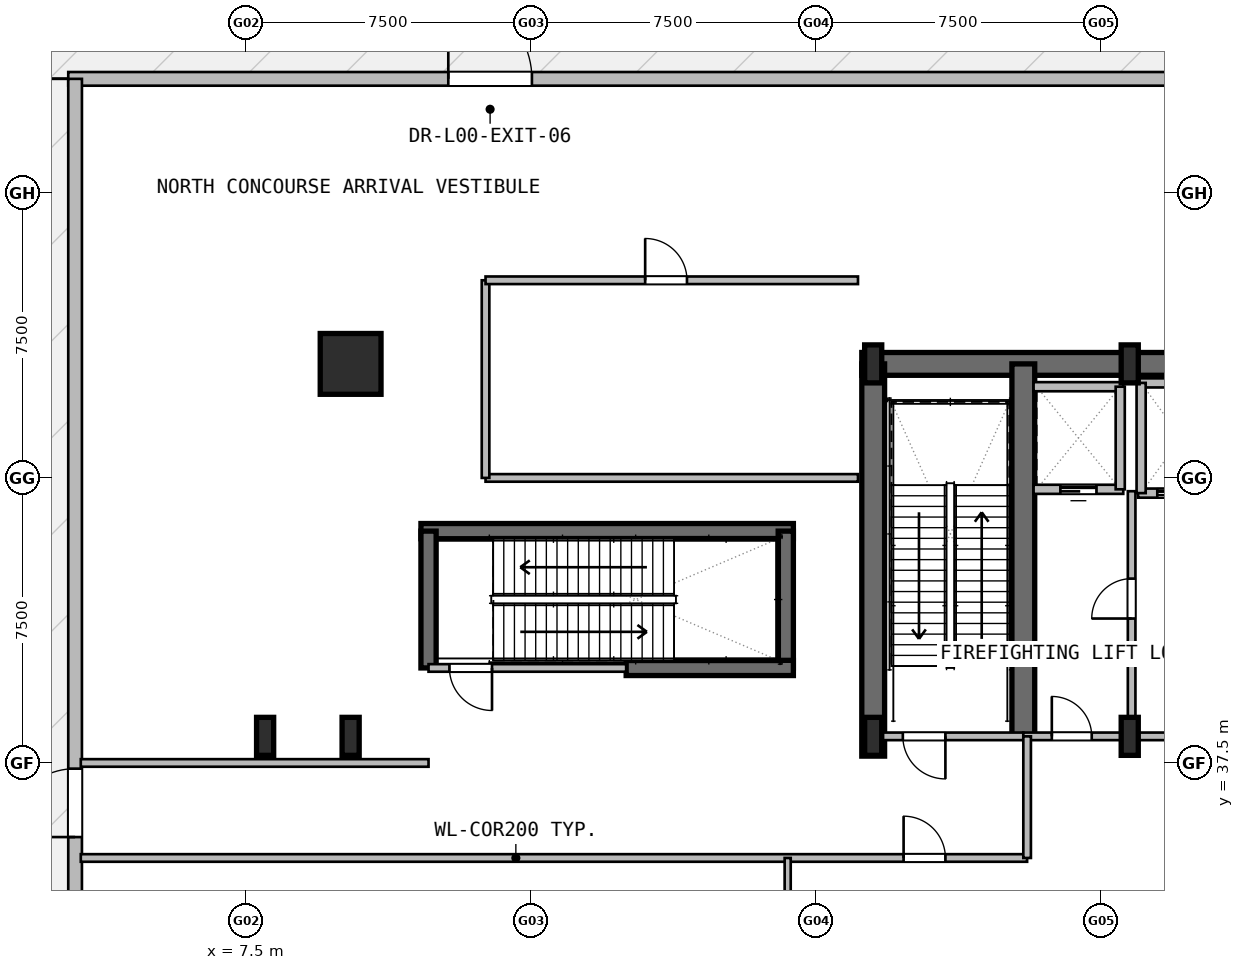
"""IFC4 building model, lengths in metres.
Left out: names, types, materials, properties, quantities, classifications, styles, units other than length and angle.
Written with IfcOpenShell. Run it as: python <this file> out.ifc"""

import sys

from ifc_helpers import new_model, si_unit, direction, frame, frame_2d, origin, origin_2d, place, context, subcontext, project, spatial, rectangle, hollow_rectangle, i_section, extrude, element, fill, save


model = new_model("IFC4")
c1 = context("Model", 3, precision=1e-05, world=origin(), true_north=direction((0.0, 1.0)))
c2 = subcontext(c1, "Body", "Model", "MODEL_VIEW")
j1 = project(units=[si_unit("LENGTHUNIT", "METRE"), si_unit("PLANEANGLEUNIT", "RADIAN")], contexts=[c1])
p1 = place(None, origin())
s1 = spatial("IfcSite", under=j1, at=p1, CompositionType="ELEMENT")
p2 = place(p1, origin())
s2 = spatial("IfcBuilding", under=s1, at=p2, CompositionType="ELEMENT")
p3 = place(p2, origin())
s3 = spatial("IfcBuildingStorey", under=s2, at=p3, CompositionType="ELEMENT", Elevation=0.0)
p4 = place(p3, frame((23.7, 48.0, 0.0), z_axis=(0.0, 0.0, 1.0), x_axis=(1.0, 0.0, 0.0)))
e1 = element("IfcWall", 1, at=p4, inside=s3, PredefinedType="SHEAR", context=c2, shape_type="SweptSolid", body=[
    extrude(rectangle(XDim=27.6, YDim=0.6, at=frame_2d((13.8, 0.0))), origin(), (0.0, 0.0, 1.0), 6.0),
])
p5 = place(p3, frame((24.0, 37.68, 0.0), z_axis=(0.0, 0.0, 1.0), x_axis=(0.0, 1.0, 0.0)))
e2 = element("IfcWall", 2, at=p5, inside=s3, PredefinedType="SHEAR", context=c2, shape_type="SweptSolid", body=[
    extrude(rectangle(XDim=10.32, YDim=0.6, at=frame_2d((5.16, 0.0))), origin(), (0.0, 0.0, 1.0), 6.0),
])
p6 = place(p3, frame((27.95, 38.2, 0.0), z_axis=(0.0, 0.0, 1.0), x_axis=(0.0, 1.0, 0.0)))
e3 = element("IfcWall", 3, at=p6, inside=s3, PredefinedType="SHEAR", context=c2, shape_type="SweptSolid", body=[
    extrude(rectangle(XDim=9.8, YDim=0.6, at=frame_2d((4.9, 0.0))), origin(), (0.0, 0.0, 1.0), 6.0),
])
p7 = place(p3, frame((10.25, 38.2, 0.0), z_axis=(0.0, 0.0, 1.0), x_axis=(1.0, 0.0, 0.0)))
e4 = element("IfcColumn", 4, at=p7, inside=s3, PredefinedType="COLUMN", context=c2, shape_type="SweptSolid", body=[
    extrude(i_section(OverallWidth=0.45, OverallDepth=1.0, WebThickness=0.022, FlangeThickness=0.04, at=origin_2d()), origin(), (0.0, 0.0, 1.0), 6.0),
])
p8 = place(p3, frame((10.25, 48.0, 0.0), z_axis=(0.0, 0.0, 1.0), x_axis=(1.0, 0.0, 0.0)))
e5 = element("IfcColumn", 5, at=p8, inside=s3, PredefinedType="COLUMN", context=c2, shape_type="SweptSolid", body=[
    extrude(hollow_rectangle(XDim=1.6, YDim=1.6, WallThickness=0.04, at=origin_2d()), origin(), (0.0, 0.0, 1.0), 6.0),
])
for number, where, z_axis, x_axis in (
    (6, (24.0, 38.2, 0.0), (0.0, 0.0, 1.0), (1.0, 0.0, 0.0)),
    (7, (24.0, 48.0, 0.0), (0.0, 0.0, 1.0), (1.0, 0.0, 0.0)),
    (8, (30.75, 38.2, 0.0), (0.0, 0.0, 1.0), (1.0, 0.0, 0.0)),
    (9, (30.75, 48.0, 0.0), (0.0, 0.0, 1.0), (1.0, 0.0, 0.0)),
    (10, (8.0, 38.2, 0.0), (0.0, 0.0, 1.0), (1.0, 0.0, 0.0)),
):
    element("IfcColumn", number, at=place(p3, frame(where, z_axis=z_axis, x_axis=x_axis)), inside=s3, PredefinedType="COLUMN", context=c2, shape_type="SweptSolid", body=[
        extrude(i_section(OverallWidth=0.45, OverallDepth=1.0, WebThickness=0.022, FlangeThickness=0.04, at=origin_2d()), origin(), (0.0, 0.0, 1.0), 6.0),
    ])
p9 = place(p3, frame((12.1, 43.6, 0.0), z_axis=(0.0, 0.0, 1.0), x_axis=(1.0, 0.0, 0.0)))
e11 = element("IfcWall", 11, at=p9, inside=s3, PredefinedType="SHEAR", context=c2, shape_type="SweptSolid", body=[
    extrude(rectangle(XDim=9.8, YDim=0.4, at=frame_2d((4.9, 0.0))), origin(), (0.0, 0.0, 1.0), 6.0),
])
for number, where, z_axis, x_axis in (
    (12, (12.3, 40.0, 0.0), (0.0, 0.0, 1.0), (0.0, 1.0, 0.0)),
    (13, (21.7, 40.0, 0.0), (0.0, 0.0, 1.0), (0.0, 1.0, 0.0)),
):
    element("IfcWall", number, at=place(p3, frame(where, z_axis=z_axis, x_axis=x_axis)), inside=s3, PredefinedType="SHEAR", context=c2, shape_type="SweptSolid", body=[
        extrude(rectangle(XDim=3.6, YDim=0.4, at=frame_2d((1.8, 0.0))), origin(), (0.0, 0.0, 1.0), 6.0),
    ])
p10 = place(p3, frame((17.5, 40.0, 0.0), z_axis=(0.0, 0.0, 1.0), x_axis=(1.0, 0.0, 0.0)))
e14 = element("IfcWall", 14, at=p10, inside=s3, PredefinedType="SHEAR", context=c2, shape_type="SweptSolid", body=[
    extrude(rectangle(XDim=4.4, YDim=0.4, at=frame_2d((2.2, 0.0))), origin(), (0.0, 0.0, 1.0), 6.0),
])
p11 = place(p3, frame((2.82, 55.5, 0.0), z_axis=(0.0, 0.0, 1.0), x_axis=(1.0, 0.0, 0.0)))
e15 = element("IfcWall", 15, at=p11, inside=s3, PredefinedType="SOLIDWALL", context=c2, shape_type="SweptSolid", body=[
    extrude(rectangle(XDim=51.18, YDim=0.36, at=frame_2d((25.59, 0.0))), origin(), (0.0, 0.0, 1.0), 5.68),
])
p12 = place(p11, frame((10.0, 0.0, 0.0)))
e16 = element("IfcOpeningElement", 16, at=p12, cuts=e15, PredefinedType="OPENING", context=c2, shape_type="SweptSolid", body=[
    extrude(rectangle(XDim=2.2, YDim=2.4, at=frame_2d((1.1, 1.2))), frame((0.0, 0.19, 0.0), z_axis=(0.0, -1.0, 0.0), x_axis=(1.0, 0.0, 0.0)), (0.0, 0.0, 1.0), 0.38),
])
p13 = place(p3, frame((3.0, 4.5, 0.0), z_axis=(0.0, 0.0, 1.0), x_axis=(0.0, 1.0, 0.0)))
e17 = element("IfcWall", 17, at=p13, inside=s3, PredefinedType="SOLIDWALL", context=c2, shape_type="SweptSolid", body=[
    extrude(rectangle(XDim=51.0, YDim=0.36, at=frame_2d((25.5, 0.0))), origin(), (0.0, 0.0, 1.0), 5.68),
])
p14 = place(p13, frame((31.05, 0.0, 0.0)))
e18 = element("IfcOpeningElement", 18, at=p14, cuts=e17, PredefinedType="OPENING", context=c2, shape_type="SweptSolid", body=[
    extrude(rectangle(XDim=1.8, YDim=2.3, at=frame_2d((0.9, 1.15))), frame((0.0, 0.19, 0.0), z_axis=(0.0, -1.0, 0.0), x_axis=(1.0, 0.0, 0.0)), (0.0, 0.0, 1.0), 0.38),
])
p15 = place(p13, frame((16.0, 0.0, 0.0)))
e19 = element("IfcOpeningElement", 19, at=p15, cuts=e17, PredefinedType="OPENING", context=c2, shape_type="SweptSolid", body=[
    extrude(rectangle(XDim=1.8, YDim=2.3, at=frame_2d((0.9, 1.15))), frame((0.0, 0.19, 0.0), z_axis=(0.0, -1.0, 0.0), x_axis=(1.0, 0.0, 0.0)), (0.0, 0.0, 1.0), 0.38),
])
p16 = place(p3, frame((27.95, 38.2, 0.0), z_axis=(0.0, 0.0, 1.0), x_axis=(-1.0, 0.0, 0.0)))
e20 = element("IfcWall", 20, at=p16, inside=s3, PredefinedType="PARTITIONING", context=c2, shape_type="SweptSolid", body=[
    extrude(rectangle(XDim=3.95, YDim=0.2, at=frame_2d((1.975, 0.0))), origin(), (0.0, 0.0, 1.0), 4.88),
])
p17 = place(p16, frame((2.05, 0.0, 0.0)))
e21 = element("IfcOpeningElement", 21, at=p17, cuts=e20, PredefinedType="OPENING", context=c2, shape_type="SweptSolid", body=[
    extrude(rectangle(XDim=1.12, YDim=2.1, at=frame_2d((0.56, 1.05))), frame((0.0, 0.11, 0.0), z_axis=(0.0, -1.0, 0.0), x_axis=(1.0, 0.0, 0.0)), (0.0, 0.0, 1.0), 0.22),
])
p18 = place(p3, frame((30.8, 38.2, 0.0), z_axis=(0.0, 0.0, 1.0), x_axis=(0.0, 1.0, 0.0)))
e22 = element("IfcWall", 22, at=p18, inside=s3, PredefinedType="PARTITIONING", context=c2, shape_type="SweptSolid", body=[
    extrude(rectangle(XDim=6.45, YDim=0.2, at=frame_2d((3.225, 0.0))), origin(), (0.0, 0.0, 1.0), 4.88),
])
p19 = place(p18, frame((3.1, 0.0, 0.0)))
e23 = element("IfcOpeningElement", 23, at=p19, cuts=e22, PredefinedType="OPENING", context=c2, shape_type="SweptSolid", body=[
    extrude(rectangle(XDim=1.05, YDim=2.1, at=frame_2d((0.525, 1.05))), frame((0.0, 0.11, 0.0), z_axis=(0.0, -1.0, 0.0), x_axis=(1.0, 0.0, 0.0)), (0.0, 0.0, 1.0), 0.22),
])
p20 = place(p3, frame((27.95, 38.2, 0.0), z_axis=(0.0, 0.0, 1.0), x_axis=(1.0, 0.0, 0.0)))
e24 = element("IfcWall", 24, at=p20, inside=s3, PredefinedType="PARTITIONING", context=c2, shape_type="SweptSolid", body=[
    extrude(rectangle(XDim=2.85, YDim=0.2, at=frame_2d((1.425, 0.0))), origin(), (0.0, 0.0, 1.0), 4.88),
])
p21 = place(p20, frame((0.75, 0.0, 0.0)))
e25 = element("IfcOpeningElement", 25, at=p21, cuts=e24, PredefinedType="OPENING", context=c2, shape_type="SweptSolid", body=[
    extrude(rectangle(XDim=1.05, YDim=2.1, at=frame_2d((0.525, 1.05))), frame((0.0, 0.11, 0.0), z_axis=(0.0, -1.0, 0.0), x_axis=(1.0, 0.0, 0.0)), (0.0, 0.0, 1.0), 0.22),
])
p22 = place(p3, frame((30.8, 38.2, 0.0), z_axis=(0.0, 0.0, 1.0), x_axis=(1.0, 0.0, 0.0)))
e26 = element("IfcWall", 26, at=p22, inside=s3, PredefinedType="PARTITIONING", context=c2, shape_type="SweptSolid", body=[
    extrude(rectangle(XDim=16.35, YDim=0.2, at=frame_2d((8.175, 0.0))), origin(), (0.0, 0.0, 1.0), 4.88),
])
p23 = place(p22, frame((2.95, 0.0, 0.0)))
e27 = element("IfcOpeningElement", 27, at=p23, cuts=e26, PredefinedType="OPENING", context=c2, shape_type="SweptSolid", body=[
    extrude(rectangle(XDim=1.12, YDim=2.1, at=frame_2d((0.56, 1.05))), frame((0.0, 0.11, 0.0), z_axis=(0.0, -1.0, 0.0), x_axis=(1.0, 0.0, 0.0)), (0.0, 0.0, 1.0), 0.22),
])
p24 = place(p3, frame((28.22, 44.7, 0.0), z_axis=(0.0, 0.0, 1.0), x_axis=(1.0, 0.0, 0.0)))
e28 = element("IfcWall", 28, at=p24, inside=s3, PredefinedType="PARTITIONING", context=c2, shape_type="SweptSolid", body=[
    extrude(rectangle(XDim=2.36, YDim=0.24, at=frame_2d((1.18, 0.0))), origin(), (0.0, 0.0, 1.0), 5.68),
])
p25 = place(p24, frame((0.705, 0.0, 0.0)))
e29 = element("IfcOpeningElement", 29, at=p25, cuts=e28, PredefinedType="OPENING", context=c2, shape_type="SweptSolid", body=[
    extrude(rectangle(XDim=0.95, YDim=2.15, at=frame_2d((0.475, 1.075))), frame((0.0, 0.13, 0.0), z_axis=(0.0, -1.0, 0.0), x_axis=(1.0, 0.0, 0.0)), (0.0, 0.0, 1.0), 0.26),
])
p26 = place(p3, frame((28.22, 47.4, 0.0), z_axis=(0.0, 0.0, 1.0), x_axis=(1.0, 0.0, 0.0)))
e30 = element("IfcWall", 30, at=p26, inside=s3, PredefinedType="PARTITIONING", context=c2, shape_type="SweptSolid", body=[
    extrude(rectangle(XDim=2.36, YDim=0.24, at=frame_2d((1.18, 0.0))), origin(), (0.0, 0.0, 1.0), 5.68),
])
p27 = place(p3, frame((30.5, 44.7, 0.0), z_axis=(0.0, 0.0, 1.0), x_axis=(0.0, 1.0, 0.0)))
e31 = element("IfcWall", 31, at=p27, inside=s3, PredefinedType="PARTITIONING", context=c2, shape_type="SweptSolid", body=[
    extrude(rectangle(XDim=2.7, YDim=0.24, at=frame_2d((1.35, 0.0))), origin(), (0.0, 0.0, 1.0), 4.88),
])
p28 = place(p3, frame((30.97, 44.6, 0.0), z_axis=(0.0, 0.0, 1.0), x_axis=(1.0, 0.0, 0.0)))
e32 = element("IfcWall", 32, at=p28, inside=s3, PredefinedType="PARTITIONING", context=c2, shape_type="SweptSolid", body=[
    extrude(rectangle(XDim=2.26, YDim=0.24, at=frame_2d((1.13, 0.0))), origin(), (0.0, 0.0, 1.0), 5.68),
])
p29 = place(p28, frame((0.505, 0.0, 0.0)))
e33 = element("IfcOpeningElement", 33, at=p29, cuts=e32, PredefinedType="OPENING", context=c2, shape_type="SweptSolid", body=[
    extrude(rectangle(XDim=1.25, YDim=2.2, at=frame_2d((0.625, 1.1))), frame((0.0, 0.13, 0.0), z_axis=(0.0, -1.0, 0.0), x_axis=(1.0, 0.0, 0.0)), (0.0, 0.0, 1.0), 0.26),
])
p30 = place(p3, frame((30.97, 47.5, 0.0), z_axis=(0.0, 0.0, 1.0), x_axis=(1.0, 0.0, 0.0)))
e34 = element("IfcWall", 34, at=p30, inside=s3, PredefinedType="PARTITIONING", context=c2, shape_type="SweptSolid", body=[
    extrude(rectangle(XDim=2.26, YDim=0.24, at=frame_2d((1.13, 0.0))), origin(), (0.0, 0.0, 1.0), 5.68),
])
p31 = place(p3, frame((31.05, 44.6, 0.0), z_axis=(0.0, 0.0, 1.0), x_axis=(0.0, 1.0, 0.0)))
e35 = element("IfcWall", 35, at=p31, inside=s3, PredefinedType="PARTITIONING", context=c2, shape_type="SweptSolid", body=[
    extrude(rectangle(XDim=2.9, YDim=0.24, at=frame_2d((1.45, 0.0))), origin(), (0.0, 0.0, 1.0), 4.88),
])
p32 = place(p3, frame((17.5, 40.0, 0.0), z_axis=(0.0, 0.0, 1.0), x_axis=(-1.0, 0.0, 0.0)))
e36 = element("IfcWall", 36, at=p32, inside=s3, PredefinedType="PARTITIONING", context=c2, shape_type="SweptSolid", body=[
    extrude(rectangle(XDim=5.2, YDim=0.2, at=frame_2d((2.6, 0.0))), origin(), (0.0, 0.0, 1.0), 5.68),
])
p33 = place(p32, frame((3.53, 0.0, 0.0)))
e37 = element("IfcOpeningElement", 37, at=p33, cuts=e36, PredefinedType="OPENING", context=c2, shape_type="SweptSolid", body=[
    extrude(rectangle(XDim=1.12, YDim=2.1, at=frame_2d((0.56, 1.05))), frame((0.0, 0.11, 0.0), z_axis=(0.0, -1.0, 0.0), x_axis=(1.0, 0.0, 0.0)), (0.0, 0.0, 1.0), 0.22),
])
p34 = place(p3, frame((3.15, 35.0, 0.0), z_axis=(0.0, 0.0, 1.0), x_axis=(1.0, 0.0, 0.0)))
e38 = element("IfcWall", 38, at=p34, inside=s3, PredefinedType="PARTITIONING", context=c2, shape_type="SweptSolid", body=[
    extrude(rectangle(XDim=24.9, YDim=0.2, at=frame_2d((12.45, 0.0))), origin(), (0.0, 0.0, 1.0), 5.68),
])
p35 = place(p34, frame((21.65, 0.0, 0.0)))
e39 = element("IfcOpeningElement", 39, at=p35, cuts=e38, PredefinedType="OPENING", context=c2, shape_type="SweptSolid", body=[
    extrude(rectangle(XDim=1.1, YDim=2.15, at=frame_2d((0.55, 1.075))), frame((0.0, 0.11, 0.0), z_axis=(0.0, -1.0, 0.0), x_axis=(1.0, 0.0, 0.0)), (0.0, 0.0, 1.0), 0.22),
])
p36 = place(p3, frame((28.05, 35.0, 0.0), z_axis=(0.0, 0.0, 1.0), x_axis=(0.0, 1.0, 0.0)))
e40 = element("IfcWall", 40, at=p36, inside=s3, PredefinedType="PARTITIONING", context=c2, shape_type="SweptSolid", body=[
    extrude(rectangle(XDim=3.2, YDim=0.2, at=frame_2d((1.6, 0.0))), origin(), (0.0, 0.0, 1.0), 5.68),
])
p37 = place(p3, frame((3.15, 37.5, 0.0), z_axis=(0.0, 0.0, 1.0), x_axis=(1.0, 0.0, 0.0)))
e41 = element("IfcWall", 41, at=p37, inside=s3, PredefinedType="PARTITIONING", context=c2, shape_type="SweptSolid", body=[
    extrude(rectangle(XDim=9.15, YDim=0.2, at=frame_2d((4.575, 0.0))), origin(), (0.0, 0.0, 1.0), 5.68),
])
p38 = place(p3, frame((13.8, 45.0, 0.0), z_axis=(0.0, 0.0, 1.0), x_axis=(1.0, 0.0, 0.0)))
e42 = element("IfcWall", 42, at=p38, inside=s3, PredefinedType="PARTITIONING", context=c2, shape_type="SweptSolid", body=[
    extrude(rectangle(XDim=9.8, YDim=0.2, at=frame_2d((4.9, 0.0))), origin(), (0.0, 0.0, 1.0), 5.68),
])
p39 = place(p3, frame((13.8, 45.0, 0.0), z_axis=(0.0, 0.0, 1.0), x_axis=(0.0, 1.0, 0.0)))
e43 = element("IfcWall", 43, at=p39, inside=s3, PredefinedType="PARTITIONING", context=c2, shape_type="SweptSolid", body=[
    extrude(rectangle(XDim=5.2, YDim=0.2, at=frame_2d((2.6, 0.0))), origin(), (0.0, 0.0, 1.0), 5.68),
])
p40 = place(p3, frame((13.8, 50.2, 0.0), z_axis=(0.0, 0.0, 1.0), x_axis=(1.0, 0.0, 0.0)))
e44 = element("IfcWall", 44, at=p40, inside=s3, PredefinedType="PARTITIONING", context=c2, shape_type="SweptSolid", body=[
    extrude(rectangle(XDim=9.8, YDim=0.2, at=frame_2d((4.9, 0.0))), origin(), (0.0, 0.0, 1.0), 5.68),
])
p41 = place(p40, frame((4.2, 0.0, 0.0)))
e45 = element("IfcOpeningElement", 45, at=p41, cuts=e44, PredefinedType="OPENING", context=c2, shape_type="SweptSolid", body=[
    extrude(rectangle(XDim=1.1, YDim=2.15, at=frame_2d((0.55, 1.075))), frame((0.0, 0.11, 0.0), z_axis=(0.0, -1.0, 0.0), x_axis=(1.0, 0.0, 0.0)), (0.0, 0.0, 1.0), 0.22),
])
p42 = place(p3, frame((21.75, 12.2, 0.0), z_axis=(0.0, 0.0, 1.0), x_axis=(0.0, 1.0, 0.0)))
e46 = element("IfcWall", 46, at=p42, inside=s3, PredefinedType="PARTITIONING", context=c2, shape_type="SweptSolid", body=[
    extrude(rectangle(XDim=22.8, YDim=0.16, at=frame_2d((11.4, 0.0))), origin(), (0.0, 0.0, 1.0), 5.68),
])
p43 = place(p42, frame((11.0, 0.0, 0.0)))
e47 = element("IfcOpeningElement", 47, at=p43, cuts=e46, PredefinedType="OPENING", context=c2, shape_type="SweptSolid", body=[
    extrude(rectangle(XDim=1.6, YDim=2.2, at=frame_2d((0.8, 1.1))), frame((0.0, 0.09, 0.0), z_axis=(0.0, -1.0, 0.0), x_axis=(1.0, 0.0, 0.0)), (0.0, 0.0, 1.0), 0.18),
])
p44 = place(p12, origin())
e48 = element("IfcDoor", 48, at=p44, inside=s3, OperationType="DOUBLE_DOOR_SINGLE_SWING", PredefinedType="DOOR", context=c2, shape_type="SweptSolid", body=[
    extrude(rectangle(XDim=2.2, YDim=2.4, at=frame_2d((1.1, 1.2))), frame((0.0, 0.025, 0.0), z_axis=(0.0, -1.0, 0.0), x_axis=(1.0, 0.0, 0.0)), (0.0, 0.0, 1.0), 0.05),
])
fill(e16, e48)
p45 = place(p14, origin())
e49 = element("IfcDoor", 49, at=p45, inside=s3, OperationType="DOUBLE_DOOR_SINGLE_SWING", PredefinedType="DOOR", context=c2, shape_type="SweptSolid", body=[
    extrude(rectangle(XDim=1.8, YDim=2.3, at=frame_2d((0.9, 1.15))), frame((0.0, 0.025, 0.0), z_axis=(0.0, -1.0, 0.0), x_axis=(1.0, 0.0, 0.0)), (0.0, 0.0, 1.0), 0.05),
])
fill(e18, e49)
p46 = place(p17, origin())
e50 = element("IfcDoor", 50, at=p46, inside=s3, OperationType="SINGLE_SWING_LEFT", PredefinedType="DOOR", context=c2, shape_type="SweptSolid", body=[
    extrude(rectangle(XDim=1.12, YDim=2.1, at=frame_2d((0.56, 1.05))), frame((0.0, 0.025, 0.0), z_axis=(0.0, -1.0, 0.0), x_axis=(1.0, 0.0, 0.0)), (0.0, 0.0, 1.0), 0.05),
])
fill(e21, e50)
p47 = place(p19, origin())
e51 = element("IfcDoor", 51, at=p47, inside=s3, OperationType="SINGLE_SWING_LEFT", PredefinedType="DOOR", context=c2, shape_type="SweptSolid", body=[
    extrude(rectangle(XDim=1.05, YDim=2.1, at=frame_2d((0.525, 1.05))), frame((0.0, 0.025, 0.0), z_axis=(0.0, -1.0, 0.0), x_axis=(1.0, 0.0, 0.0)), (0.0, 0.0, 1.0), 0.05),
])
fill(e23, e51)
p48 = place(p21, origin())
e52 = element("IfcDoor", 52, at=p48, inside=s3, OperationType="SINGLE_SWING_RIGHT", PredefinedType="DOOR", context=c2, shape_type="SweptSolid", body=[
    extrude(rectangle(XDim=1.05, YDim=2.1, at=frame_2d((0.525, 1.05))), frame((0.0, 0.025, 0.0), z_axis=(0.0, -1.0, 0.0), x_axis=(1.0, 0.0, 0.0)), (0.0, 0.0, 1.0), 0.05),
])
fill(e25, e52)
p49 = place(p25, origin())
e53 = element("IfcDoor", 53, at=p49, inside=s3, OperationType="SLIDING_TO_LEFT", PredefinedType="DOOR", context=c2, shape_type="SweptSolid", body=[
    extrude(rectangle(XDim=0.95, YDim=2.15, at=frame_2d((0.475, 1.075))), frame((0.0, 0.025, 0.0), z_axis=(0.0, -1.0, 0.0), x_axis=(1.0, 0.0, 0.0)), (0.0, 0.0, 1.0), 0.05),
])
fill(e29, e53)
p50 = place(p29, origin())
e54 = element("IfcDoor", 54, at=p50, inside=s3, OperationType="SLIDING_TO_LEFT", PredefinedType="DOOR", context=c2, shape_type="SweptSolid", body=[
    extrude(rectangle(XDim=1.25, YDim=2.2, at=frame_2d((0.625, 1.1))), frame((0.0, 0.025, 0.0), z_axis=(0.0, -1.0, 0.0), x_axis=(1.0, 0.0, 0.0)), (0.0, 0.0, 1.0), 0.05),
])
fill(e33, e54)
p51 = place(p33, origin())
e55 = element("IfcDoor", 55, at=p51, inside=s3, OperationType="SINGLE_SWING_LEFT", PredefinedType="DOOR", context=c2, shape_type="SweptSolid", body=[
    extrude(rectangle(XDim=1.12, YDim=2.1, at=frame_2d((0.56, 1.05))), frame((0.0, 0.025, 0.0), z_axis=(0.0, -1.0, 0.0), x_axis=(1.0, 0.0, 0.0)), (0.0, 0.0, 1.0), 0.05),
])
fill(e37, e55)
p52 = place(p35, origin())
e56 = element("IfcDoor", 56, at=p52, inside=s3, OperationType="SINGLE_SWING_RIGHT", PredefinedType="DOOR", context=c2, shape_type="SweptSolid", body=[
    extrude(rectangle(XDim=1.1, YDim=2.15, at=frame_2d((0.55, 1.075))), frame((0.0, 0.025, 0.0), z_axis=(0.0, -1.0, 0.0), x_axis=(1.0, 0.0, 0.0)), (0.0, 0.0, 1.0), 0.05),
])
fill(e39, e56)
p53 = place(p41, origin())
e57 = element("IfcDoor", 57, at=p53, inside=s3, OperationType="SINGLE_SWING_LEFT", PredefinedType="DOOR", context=c2, shape_type="SweptSolid", body=[
    extrude(rectangle(XDim=1.1, YDim=2.15, at=frame_2d((0.55, 1.075))), frame((0.0, 0.025, 0.0), z_axis=(0.0, -1.0, 0.0), x_axis=(1.0, 0.0, 0.0)), (0.0, 0.0, 1.0), 0.05),
])
fill(e45, e57)
save(model, sys.argv[1])
